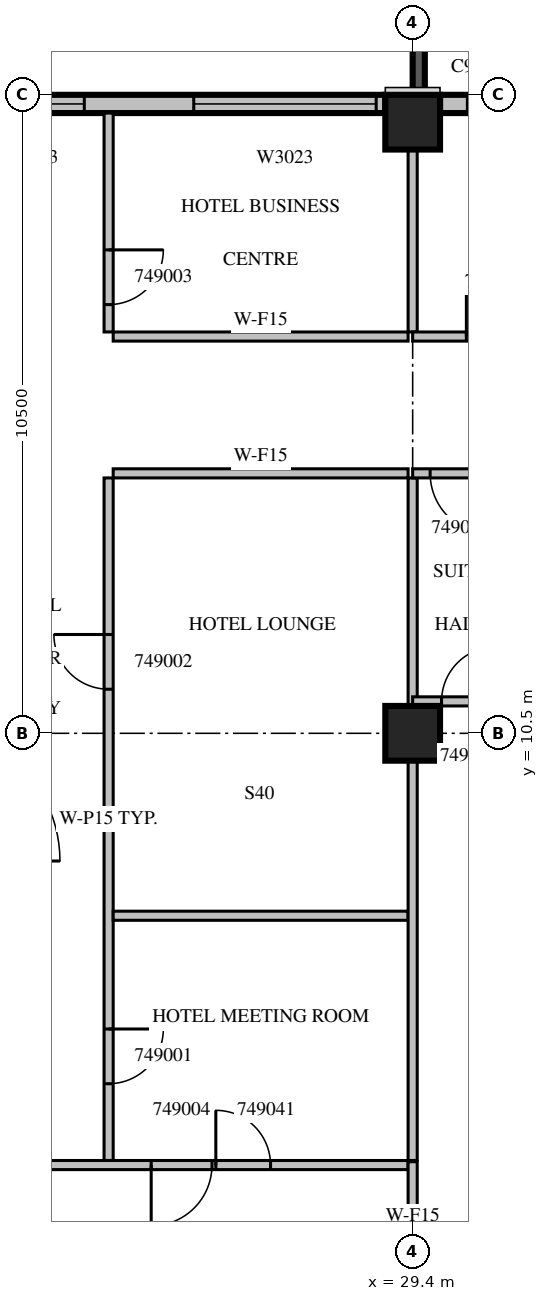
"""IFC4 building model, lengths in metres.
Left out: names, types, materials, properties, quantities, classifications, styles, units other than length and angle.
Written with IfcOpenShell. Run it as: python <this file> out.ifc"""

import sys

from ifc_helpers import new_model, si_unit, direction, frame, frame_2d, origin, origin_2d, place, context, subcontext, project, spatial, rectangle, extrude, source, transform, mapped, element, fill, save


model = new_model("IFC4")
c1 = context("Model", 3, precision=1e-05, world=origin(), true_north=direction((0.0, 1.0)))
c2 = subcontext(c1, "Body", "Model", "MODEL_VIEW")
j1 = project(units=[si_unit("LENGTHUNIT", "METRE"), si_unit("PLANEANGLEUNIT", "RADIAN")], contexts=[c1])
p1 = place(None, origin())
s1 = spatial("IfcSite", under=j1, at=p1, CompositionType="ELEMENT")
p2 = place(p1, origin())
s2 = spatial("IfcBuilding", under=s1, at=p2, CompositionType="ELEMENT")
p3 = place(p2, frame((0.0, 0.0, 219.6)))
s3 = spatial("IfcBuildingStorey", under=s2, at=p3, CompositionType="ELEMENT", Elevation=219.6)
m1 = source(origin(), c2, "Body", "SweptSolid", [
    extrude(rectangle(XDim=0.9, YDim=0.9, at=origin_2d()), origin(), (0.0, 0.0, 1.0), 3.8),
])
for number, where, z_axis, x_axis in (
    (1, (29.4, 10.5, 0.0), (0.0, 0.0, 1.0), (1.0, 0.0, 0.0)),
    (2, (29.4, 20.55, 0.0), (0.0, 0.0, 1.0), (1.0, 0.0, 0.0)),
):
    element("IfcColumn", number, at=place(p3, frame(where, z_axis=z_axis, x_axis=x_axis)), inside=s3, PredefinedType="COLUMN", context=c2, shape_type="MappedRepresentation", body=[
        mapped(m1, transform((0.0, 0.0, 0.0), scale=1.0)),
    ])
m2 = source(origin(), c2, "Body", "SweptSolid", [
    extrude(rectangle(XDim=3.9, YDim=0.2, at=frame_2d((1.95, 0.0))), origin(), (0.0, 0.0, 1.0), 3.4),
])
p4 = place(p3, frame((29.5, 21.0, 0.0), z_axis=(0.0, 0.0, 1.0), x_axis=(0.0, 1.0, 0.0)))
e3 = element("IfcWall", 3, at=p4, inside=s3, PredefinedType="SOLIDWALL", context=c2, shape_type="MappedRepresentation", body=[
    mapped(m2, transform((0.0, 0.0, 0.0), scale=1.0)),
])
m3 = source(origin(), c2, "Body", "SweptSolid", [
    extrude(rectangle(XDim=2.4, YDim=2.3, at=frame_2d((1.2, 1.15))), frame((0.0, 0.11, 0.0), z_axis=(0.0, -1.0, 0.0), x_axis=(1.0, 0.0, 0.0)), (0.0, 0.0, 1.0), 0.22),
])
p5 = place(p4, frame((0.75, 0.0, 0.6)))
e4 = element("IfcOpeningElement", 4, at=p5, cuts=e3, PredefinedType="OPENING", context=c2, shape_type="MappedRepresentation", body=[
    mapped(m3, transform((0.0, 0.0, 0.0), scale=1.0)),
])
m4 = source(origin(), c2, "Body", "SweptSolid", [
    extrude(rectangle(XDim=7.05, YDim=0.3, at=frame_2d((3.525, 0.0))), origin(), (0.0, 0.0, 1.0), 3.4),
])
p6 = place(p3, frame((36.9, 20.85, 0.0), z_axis=(0.0, 0.0, 1.0), x_axis=(-1.0, 0.0, 0.0)))
e5 = element("IfcWall", 5, at=p6, inside=s3, PredefinedType="STANDARD", context=c2, shape_type="MappedRepresentation", body=[
    mapped(m4, transform((0.0, 0.0, 0.0), scale=1.0)),
])
m5 = source(origin(), c2, "Body", "SweptSolid", [
    extrude(rectangle(XDim=1.8, YDim=2.3, at=frame_2d((0.9, 1.15))), frame((0.0, 0.16, 0.0), z_axis=(0.0, -1.0, 0.0), x_axis=(1.0, 0.0, 0.0)), (0.0, 0.0, 1.0), 0.32),
])
p7 = place(p6, frame((0.3, 0.0, 0.6)))
e6 = element("IfcOpeningElement", 6, at=p7, cuts=e5, PredefinedType="OPENING", context=c2, shape_type="MappedRepresentation", body=[
    mapped(m5, transform((0.0, 0.0, 0.0), scale=1.0)),
])
m6 = source(origin(), c2, "Body", "SweptSolid", [
    extrude(rectangle(XDim=1.0, YDim=2.1, at=frame_2d((0.5, 1.05))), frame((0.0, 0.16, 0.0), z_axis=(0.0, -1.0, 0.0), x_axis=(1.0, 0.0, 0.0)), (0.0, 0.0, 1.0), 0.32),
])
p8 = place(p6, frame((5.6, 0.0, 0.0)))
e7 = element("IfcOpeningElement", 7, at=p8, cuts=e5, PredefinedType="OPENING", context=c2, shape_type="MappedRepresentation", body=[
    mapped(m6, transform((0.0, 0.0, 0.0), scale=1.0)),
])
m7 = source(origin(), c2, "Body", "SweptSolid", [
    extrude(rectangle(XDim=7.15, YDim=0.3, at=frame_2d((3.575, 0.0))), origin(), (0.0, 0.0, 1.0), 3.4),
])
p9 = place(p3, frame((28.95, 20.85, 0.0), z_axis=(0.0, 0.0, 1.0), x_axis=(-1.0, 0.0, 0.0)))
e8 = element("IfcWall", 8, at=p9, inside=s3, PredefinedType="STANDARD", context=c2, shape_type="MappedRepresentation", body=[
    mapped(m7, transform((0.0, 0.0, 0.0), scale=1.0)),
])
m8 = source(origin(), c2, "Body", "SweptSolid", [
    extrude(rectangle(XDim=3.0, YDim=2.3, at=frame_2d((1.5, 1.15))), frame((0.0, 0.16, 0.0), z_axis=(0.0, -1.0, 0.0), x_axis=(1.0, 0.0, 0.0)), (0.0, 0.0, 1.0), 0.32),
])
p10 = place(p9, frame((0.15, 0.0, 0.6)))
e9 = element("IfcOpeningElement", 9, at=p10, cuts=e8, PredefinedType="OPENING", context=c2, shape_type="MappedRepresentation", body=[
    mapped(m8, transform((0.0, 0.0, 0.0), scale=1.0)),
])
p11 = place(p9, frame((4.95, 0.0, 0.6)))
e10 = element("IfcOpeningElement", 10, at=p11, cuts=e8, PredefinedType="OPENING", context=c2, shape_type="MappedRepresentation", body=[
    mapped(m5, transform((0.0, 0.0, 0.0), scale=1.0)),
])
m9 = source(origin(), c2, "Body", "SweptSolid", [
    extrude(rectangle(XDim=11.225, YDim=0.15, at=frame_2d((5.612, 0.0))), origin(), (0.0, 0.0, 1.0), 3.4),
])
p12 = place(p3, frame((24.4, 14.7, 0.0), z_axis=(0.0, 0.0, 1.0), x_axis=(0.0, -1.0, 0.0)))
e11 = element("IfcWall", 11, at=p12, inside=s3, PredefinedType="PARTITIONING", context=c2, shape_type="MappedRepresentation", body=[
    mapped(m9, transform((0.0, 0.0, 0.0), scale=1.0)),
])
m10 = source(origin(), c2, "Body", "SweptSolid", [
    extrude(rectangle(XDim=0.9, YDim=2.1, at=frame_2d((0.45, 1.05))), frame((0.0, 0.085, 0.0), z_axis=(0.0, -1.0, 0.0), x_axis=(1.0, 0.0, 0.0)), (0.0, 0.0, 1.0), 0.17),
])
p13 = place(p12, frame((9.062, 0.0, 0.0)))
e12 = element("IfcOpeningElement", 12, at=p13, cuts=e11, PredefinedType="OPENING", context=c2, shape_type="MappedRepresentation", body=[
    mapped(m10, transform((0.0, 0.0, 0.0), scale=1.0)),
])
p14 = place(p12, frame((2.575, 0.0, 0.0)))
e13 = element("IfcOpeningElement", 13, at=p14, cuts=e11, PredefinedType="OPENING", context=c2, shape_type="MappedRepresentation", body=[
    mapped(m10, transform((0.0, 0.0, 0.0), scale=1.0)),
])
m11 = source(origin(), c2, "Body", "SweptSolid", [
    extrude(rectangle(XDim=3.6, YDim=0.15, at=frame_2d((1.8, 0.0))), origin(), (0.0, 0.0, 1.0), 3.4),
])
p15 = place(p3, frame((24.4, 20.7, 0.0), z_axis=(0.0, 0.0, 1.0), x_axis=(0.0, -1.0, 0.0)))
e14 = element("IfcWall", 14, at=p15, inside=s3, PredefinedType="PARTITIONING", context=c2, shape_type="MappedRepresentation", body=[
    mapped(m11, transform((0.0, 0.0, 0.0), scale=1.0)),
])
p16 = place(p15, frame((2.25, 0.0, 0.0)))
e15 = element("IfcOpeningElement", 15, at=p16, cuts=e14, PredefinedType="OPENING", context=c2, shape_type="MappedRepresentation", body=[
    mapped(m10, transform((0.0, 0.0, 0.0), scale=1.0)),
])
m12 = source(origin(), c2, "Body", "SweptSolid", [
    extrude(rectangle(XDim=4.85, YDim=0.15, at=frame_2d((2.425, 0.0))), origin(), (0.0, 0.0, 1.0), 3.4),
])
for number, where, z_axis, x_axis in (
    (16, (29.325, 7.5, 0.0), (0.0, 0.0, 1.0), (-1.0, 0.0, 0.0)),
    (17, (29.325, 14.775, 0.0), (0.0, 0.0, 1.0), (-1.0, 0.0, 0.0)),
    (18, (24.475, 17.025, 0.0), (0.0, 0.0, 1.0), (1.0, 0.0, 0.0)),
):
    element("IfcWall", number, at=place(p3, frame(where, z_axis=z_axis, x_axis=x_axis)), inside=s3, PredefinedType="PARTITIONING", context=c2, shape_type="MappedRepresentation", body=[
        mapped(m12, transform((0.0, 0.0, 0.0), scale=1.0)),
    ])
m13 = source(origin(), c2, "Body", "SweptSolid", [
    extrude(rectangle(XDim=6.576, YDim=0.15, at=frame_2d((3.288, 0.0))), origin(), (0.0, 0.0, 1.0), 3.4),
])
p17 = place(p3, frame((29.4, 3.475, 0.0), z_axis=(0.0, 0.0, 1.0), x_axis=(0.0, 1.0, 0.0)))
e19 = element("IfcWall", 19, at=p17, inside=s3, PredefinedType="PARTITIONING", context=c2, shape_type="MappedRepresentation", body=[
    mapped(m13, transform((0.0, 0.0, 0.0), scale=1.0)),
])
m14 = source(origin(), c2, "Body", "SweptSolid", [
    extrude(rectangle(XDim=3.751, YDim=0.15, at=frame_2d((1.875, 0.0))), origin(), (0.0, 0.0, 1.0), 3.4),
])
p18 = place(p3, frame((29.4, 10.949, 0.0), z_axis=(0.0, 0.0, 1.0), x_axis=(0.0, 1.0, 0.0)))
e20 = element("IfcWall", 20, at=p18, inside=s3, PredefinedType="PARTITIONING", context=c2, shape_type="MappedRepresentation", body=[
    mapped(m14, transform((0.0, 0.0, 0.0), scale=1.0)),
])
m15 = source(origin(), c2, "Body", "SweptSolid", [
    extrude(rectangle(XDim=3.001, YDim=0.15, at=frame_2d((1.5, 0.0))), origin(), (0.0, 0.0, 1.0), 3.4),
])
p19 = place(p3, frame((29.4, 17.1, 0.0), z_axis=(0.0, 0.0, 1.0), x_axis=(0.0, 1.0, 0.0)))
e21 = element("IfcWall", 21, at=p19, inside=s3, PredefinedType="PARTITIONING", context=c2, shape_type="MappedRepresentation", body=[
    mapped(m15, transform((0.0, 0.0, 0.0), scale=1.0)),
])
m16 = source(origin(), c2, "Body", "SweptSolid", [
    extrude(rectangle(XDim=7.525, YDim=0.15, at=frame_2d((3.763, 0.0))), origin(), (0.0, 0.0, 1.0), 3.4),
])
p20 = place(p3, frame((21.8, 3.4, 0.0), z_axis=(0.0, 0.0, 1.0), x_axis=(1.0, 0.0, 0.0)))
e22 = element("IfcWall", 22, at=p20, inside=s3, PredefinedType="PARTITIONING", context=c2, shape_type="MappedRepresentation", body=[
    mapped(m16, transform((0.0, 0.0, 0.0), scale=1.0)),
])
m17 = source(origin(), c2, "Body", "SweptSolid", [
    extrude(rectangle(XDim=1.0, YDim=2.1, at=frame_2d((0.5, 1.05))), frame((0.0, 0.085, 0.0), z_axis=(0.0, -1.0, 0.0), x_axis=(1.0, 0.0, 0.0)), (0.0, 0.0, 1.0), 0.17),
])
p21 = place(p20, frame((3.3, 0.0, 0.0)))
e23 = element("IfcOpeningElement", 23, at=p21, cuts=e22, PredefinedType="OPENING", context=c2, shape_type="MappedRepresentation", body=[
    mapped(m17, transform((0.0, 0.0, 0.0), scale=1.0)),
])
p22 = place(p20, frame((4.363, 0.0, 0.0)))
e24 = element("IfcOpeningElement", 24, at=p22, cuts=e22, PredefinedType="OPENING", context=c2, shape_type="MappedRepresentation", body=[
    mapped(m10, transform((0.0, 0.0, 0.0), scale=1.0)),
])
m18 = source(origin(), c2, "Body", "SweptSolid", [
    extrude(rectangle(XDim=2.556, YDim=0.15, at=frame_2d((1.278, 0.0))), origin(), (0.0, 0.0, 1.0), 3.4),
])
p23 = place(p3, frame((29.4, 0.899, 0.0), z_axis=(0.0, 0.0, 1.0), x_axis=(0.0, 1.0, 0.0)))
e25 = element("IfcWall", 25, at=p23, inside=s3, PredefinedType="PARTITIONING", context=c2, shape_type="MappedRepresentation", body=[
    mapped(m18, transform((0.0, 0.0, 0.0), scale=1.0)),
])
m19 = source(origin(), c2, "Body", "SweptSolid", [
    extrude(rectangle(XDim=8.4, YDim=0.15, at=frame_2d((4.2, 0.0))), origin(), (0.0, 0.0, 1.0), 3.4),
])
p24 = place(p3, frame((37.8, 11.025, 0.0), z_axis=(0.0, 0.0, 1.0), x_axis=(-1.0, 0.0, 0.0)))
e26 = element("IfcWall", 26, at=p24, inside=s3, PredefinedType="PARTITIONING", context=c2, shape_type="MappedRepresentation", body=[
    mapped(m19, transform((0.0, 0.0, 0.0), scale=1.0)),
])
p25 = place(p24, frame((7.025, 0.0, 0.0)))
e27 = element("IfcOpeningElement", 27, at=p25, cuts=e26, PredefinedType="OPENING", context=c2, shape_type="MappedRepresentation", body=[
    mapped(m10, transform((0.0, 0.0, 0.0), scale=1.0)),
])
p26 = place(p24, frame((5.013, 0.0, 0.0)))
e28 = element("IfcOpeningElement", 28, at=p26, cuts=e26, PredefinedType="OPENING", context=c2, shape_type="MappedRepresentation", body=[
    mapped(m10, transform((0.0, 0.0, 0.0), scale=1.0)),
])
p27 = place(p24, frame((2.9, 0.0, 0.0)))
e29 = element("IfcOpeningElement", 29, at=p27, cuts=e26, PredefinedType="OPENING", context=c2, shape_type="MappedRepresentation", body=[
    mapped(m17, transform((0.0, 0.0, 0.0), scale=1.0)),
])
p28 = place(p24, frame((1.087, 0.0, 0.0)))
e30 = element("IfcOpeningElement", 30, at=p28, cuts=e26, PredefinedType="OPENING", context=c2, shape_type="MappedRepresentation", body=[
    mapped(m10, transform((0.0, 0.0, 0.0), scale=1.0)),
])
p29 = place(p3, frame((37.8, 14.775, 0.0), z_axis=(0.0, 0.0, 1.0), x_axis=(-1.0, 0.0, 0.0)))
e31 = element("IfcWall", 31, at=p29, inside=s3, PredefinedType="PARTITIONING", context=c2, shape_type="MappedRepresentation", body=[
    mapped(m19, transform((0.0, 0.0, 0.0), scale=1.0)),
])
p30 = place(p29, frame((7.112, 0.0, 0.0)))
e32 = element("IfcOpeningElement", 32, at=p30, cuts=e31, PredefinedType="OPENING", context=c2, shape_type="MappedRepresentation", body=[
    mapped(m17, transform((0.0, 0.0, 0.0), scale=1.0)),
])
p31 = place(p29, frame((2.95, 0.0, 0.0)))
e33 = element("IfcOpeningElement", 33, at=p31, cuts=e31, PredefinedType="OPENING", context=c2, shape_type="MappedRepresentation", body=[
    mapped(m17, transform((0.0, 0.0, 0.0), scale=1.0)),
])
p32 = place(p3, frame((29.4, 17.025, 0.0), z_axis=(0.0, 0.0, 1.0), x_axis=(1.0, 0.0, 0.0)))
e34 = element("IfcWall", 34, at=p32, inside=s3, PredefinedType="PARTITIONING", context=c2, shape_type="MappedRepresentation", body=[
    mapped(m19, transform((0.0, 0.0, 0.0), scale=1.0)),
])
p33 = place(p32, frame((0.883, 0.0, 0.0)))
e35 = element("IfcOpeningElement", 35, at=p33, cuts=e34, PredefinedType="OPENING", context=c2, shape_type="MappedRepresentation", body=[
    mapped(m10, transform((0.0, 0.0, 0.0), scale=1.0)),
])
p34 = place(p32, frame((2.983, 0.0, 0.0)))
e36 = element("IfcOpeningElement", 36, at=p34, cuts=e34, PredefinedType="OPENING", context=c2, shape_type="MappedRepresentation", body=[
    mapped(m10, transform((0.0, 0.0, 0.0), scale=1.0)),
])
p35 = place(p32, frame((6.463, 0.0, 0.0)))
e37 = element("IfcOpeningElement", 37, at=p35, cuts=e34, PredefinedType="OPENING", context=c2, shape_type="MappedRepresentation", body=[
    mapped(m17, transform((0.0, 0.0, 0.0), scale=1.0)),
])
m20 = source(origin(), c2, "Body", "SweptSolid", [
    extrude(rectangle(XDim=3.0, YDim=2.3, at=frame_2d((1.5, 1.15))), frame((0.0, 0.03, 0.0), z_axis=(0.0, -1.0, 0.0), x_axis=(1.0, 0.0, 0.0)), (0.0, 0.0, 1.0), 0.06),
])
p36 = place(p10, origin())
e38 = element("IfcWindow", 38, at=p36, inside=s3, PartitioningType="SINGLE_PANEL", PredefinedType="WINDOW", context=c2, shape_type="MappedRepresentation", body=[
    mapped(m20, transform((0.0, 0.0, 0.0), scale=1.0)),
])
fill(e9, e38)
m21 = source(origin(), c2, "Body", "SweptSolid", [
    extrude(rectangle(XDim=1.8, YDim=2.3, at=frame_2d((0.9, 1.15))), frame((0.0, 0.03, 0.0), z_axis=(0.0, -1.0, 0.0), x_axis=(1.0, 0.0, 0.0)), (0.0, 0.0, 1.0), 0.06),
])
p37 = place(p11, origin())
e39 = element("IfcWindow", 39, at=p37, inside=s3, PartitioningType="SINGLE_PANEL", PredefinedType="WINDOW", context=c2, shape_type="MappedRepresentation", body=[
    mapped(m21, transform((0.0, 0.0, 0.0), scale=1.0)),
])
fill(e10, e39)
m22 = source(origin(), c2, "Body", "SweptSolid", [
    extrude(rectangle(XDim=0.9, YDim=2.1, at=frame_2d((0.45, 1.05))), frame((0.0, 0.025, 0.0), z_axis=(0.0, -1.0, 0.0), x_axis=(1.0, 0.0, 0.0)), (0.0, 0.0, 1.0), 0.05),
])
p38 = place(p13, origin())
e40 = element("IfcDoor", 40, at=p38, inside=s3, OperationType="SINGLE_SWING_LEFT", PredefinedType="DOOR", context=c2, shape_type="MappedRepresentation", body=[
    mapped(m22, transform((0.0, 0.0, 0.0), scale=1.0)),
])
fill(e12, e40)
p39 = place(p14, origin())
e41 = element("IfcDoor", 41, at=p39, inside=s3, OperationType="SINGLE_SWING_RIGHT", PredefinedType="DOOR", context=c2, shape_type="MappedRepresentation", body=[
    mapped(m22, transform((0.0, 0.0, 0.0), scale=1.0)),
])
fill(e13, e41)
p40 = place(p16, origin())
e42 = element("IfcDoor", 42, at=p40, inside=s3, OperationType="SINGLE_SWING_LEFT", PredefinedType="DOOR", context=c2, shape_type="MappedRepresentation", body=[
    mapped(m22, transform((0.0, 0.0, 0.0), scale=1.0)),
])
fill(e15, e42)
m23 = source(origin(), c2, "Body", "SweptSolid", [
    extrude(rectangle(XDim=1.0, YDim=2.1, at=frame_2d((0.5, 1.05))), frame((0.0, 0.025, 0.0), z_axis=(0.0, -1.0, 0.0), x_axis=(1.0, 0.0, 0.0)), (0.0, 0.0, 1.0), 0.05),
])
p41 = place(p21, origin())
e43 = element("IfcDoor", 43, at=p41, inside=s3, OperationType="SINGLE_SWING_RIGHT", PredefinedType="DOOR", context=c2, shape_type="MappedRepresentation", body=[
    mapped(m23, transform((0.0, 0.0, 0.0), scale=1.0)),
])
fill(e23, e43)
p42 = place(p30, origin())
e44 = element("IfcDoor", 44, at=p42, inside=s3, OperationType="SINGLE_SWING_LEFT", PredefinedType="DOOR", context=c2, shape_type="MappedRepresentation", body=[
    mapped(m23, transform((0.0, 0.0, 0.0), scale=1.0)),
])
fill(e32, e44)
p43 = place(p25, origin())
e45 = element("IfcDoor", 45, at=p43, inside=s3, OperationType="SINGLE_SWING_RIGHT", PredefinedType="DOOR", context=c2, shape_type="MappedRepresentation", body=[
    mapped(m22, transform((0.0, 0.0, 0.0), scale=1.0)),
])
fill(e27, e45)
p44 = place(p33, origin())
e46 = element("IfcDoor", 46, at=p44, inside=s3, OperationType="SINGLE_SWING_LEFT", PredefinedType="DOOR", context=c2, shape_type="MappedRepresentation", body=[
    mapped(m22, transform((0.0, 0.0, 0.0), scale=1.0)),
])
fill(e35, e46)
p45 = place(p22, origin())
e47 = element("IfcDoor", 47, at=p45, inside=s3, OperationType="SINGLE_SWING_LEFT", PredefinedType="DOOR", context=c2, shape_type="MappedRepresentation", body=[
    mapped(m22, transform((0.0, 0.0, 0.0), scale=1.0)),
])
fill(e24, e47)
p46 = place(p8, origin())
e48 = element("IfcDoor", 48, at=p46, inside=s3, OperationType="SINGLE_SWING_LEFT", PredefinedType="DOOR", context=c2, shape_type="MappedRepresentation", body=[
    mapped(m23, transform((0.0, 0.0, 0.0), scale=1.0)),
])
fill(e7, e48)
save(model, sys.argv[1])
